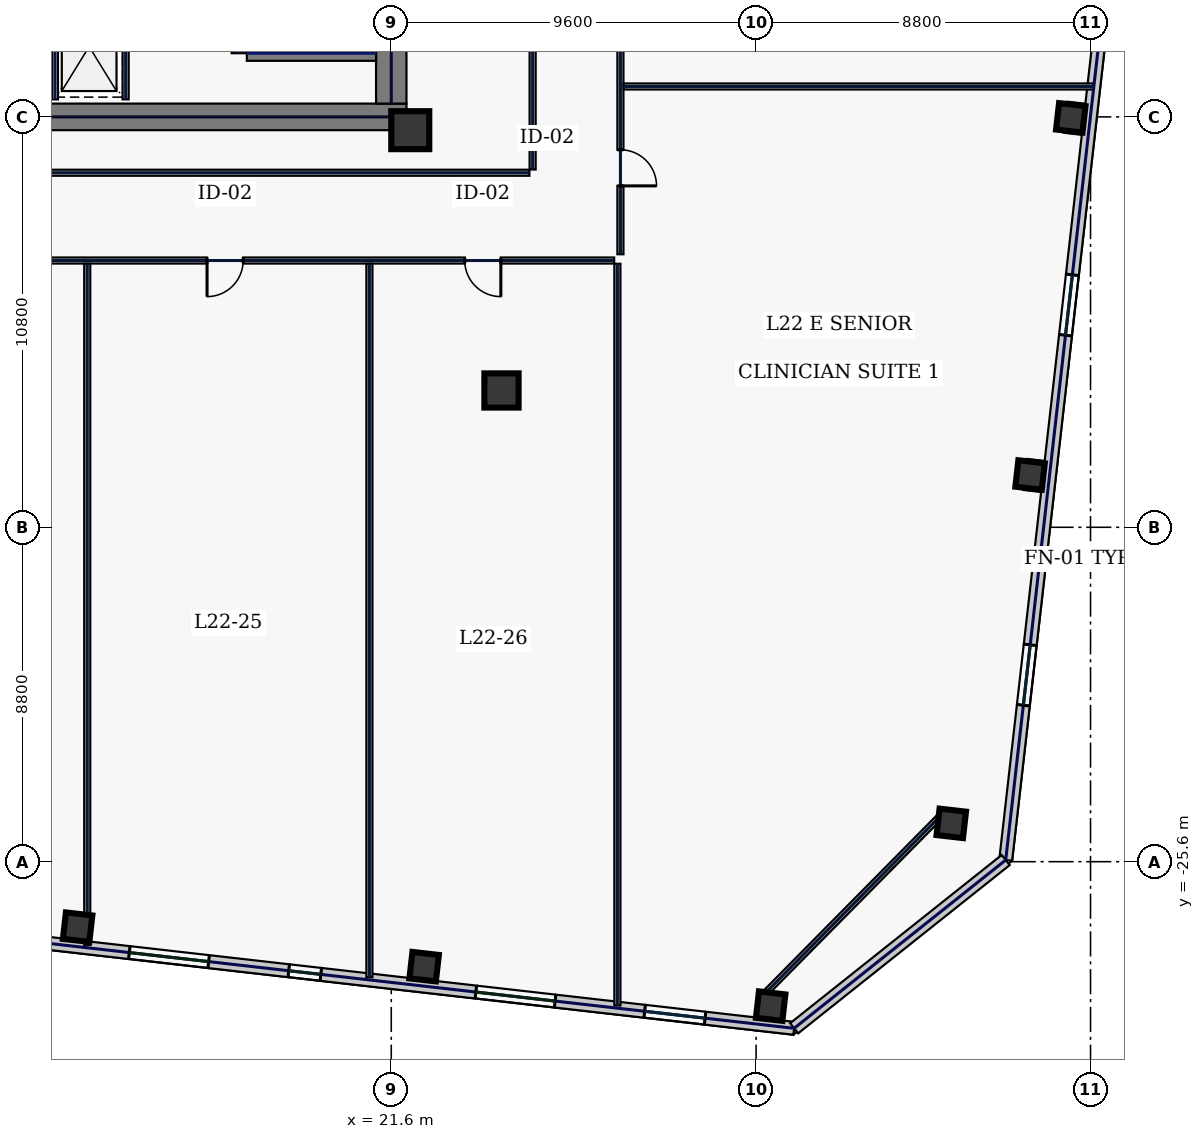
"""IFC4 building model, lengths in metres.
Left out: names, types, materials, properties, quantities, classifications, styles, units other than length and angle.
Written with IfcOpenShell. Run it as: python <this file> out.ifc"""

import sys

from ifc_helpers import new_model, si_unit, direction, frame, frame_2d, origin, origin_2d, place, context, subcontext, project, spatial, rectangle, hollow_rectangle, extrude, element, fill, save


model = new_model("IFC4")
c1 = context("Model", 3, precision=1e-05, world=origin(), true_north=direction((0.0, 1.0)))
c2 = subcontext(c1, "Body", "Model", "MODEL_VIEW")
j1 = project(units=[si_unit("LENGTHUNIT", "METRE"), si_unit("PLANEANGLEUNIT", "RADIAN")], contexts=[c1])
p1 = place(None, origin())
s1 = spatial("IfcSite", under=j1, at=p1, CompositionType="ELEMENT")
p2 = place(p1, origin())
s2 = spatial("IfcBuilding", under=s1, at=p2, CompositionType="ELEMENT")
p3 = place(p2, frame((0.0, 0.0, 101.4)))
s3 = spatial("IfcBuildingStorey", under=s2, at=p3, CompositionType="ELEMENT", Elevation=101.4)
p4 = place(p3, frame((10.45, -6.0, 0.0), z_axis=(0.0, 0.0, 1.0), x_axis=(1.0, 0.0, 0.0)))
e1 = element("IfcWall", 1, at=p4, inside=s3, PredefinedType="SHEAR", context=c2, shape_type="SweptSolid", body=[
    extrude(rectangle(XDim=11.55, YDim=0.7, at=frame_2d((5.775, 0.0))), origin(), (0.0, 0.0, 1.0), 3.74),
])
p5 = place(p3, frame((21.6, -5.65, 0.0), z_axis=(0.0, 0.0, 1.0), x_axis=(0.0, 1.0, 0.0)))
e2 = element("IfcWall", 2, at=p5, inside=s3, PredefinedType="SHEAR", context=c2, shape_type="SweptSolid", body=[
    extrude(rectangle(XDim=11.3, YDim=0.8, at=frame_2d((5.65, 0.0))), origin(), (0.0, 0.0, 1.0), 3.74),
])
p6 = place(p3, frame((17.6, -4.325, 0.0), z_axis=(0.0, 0.0, 1.0), x_axis=(0.0, 1.0, 0.0)))
e3 = element("IfcWall", 3, at=p6, inside=s3, PredefinedType="SHEAR", context=c2, shape_type="SweptSolid", body=[
    extrude(rectangle(XDim=8.65, YDim=0.4, at=frame_2d((4.325, 0.0))), origin(), (0.0, 0.0, 1.0), 3.74),
])
p7 = place(p6, frame((0.25, 0.0, 0.0)))
e4 = element("IfcOpeningElement", 4, at=p7, cuts=e3, PredefinedType="OPENING", context=c2, shape_type="SweptSolid", body=[
    extrude(rectangle(XDim=1.1, YDim=2.2, at=frame_2d((0.55, 1.1))), frame((0.0, 0.21, 0.0), z_axis=(0.0, -1.0, 0.0), x_axis=(1.0, 0.0, 0.0)), (0.0, 0.0, 1.0), 0.42),
])
p8 = place(p3, frame((17.8, -4.325, 0.0), z_axis=(0.0, 0.0, 1.0), x_axis=(1.0, 0.0, 0.0)))
e5 = element("IfcWall", 5, at=p8, inside=s3, PredefinedType="SHEAR", context=c2, shape_type="SweptSolid", body=[
    extrude(rectangle(XDim=3.4, YDim=0.4, at=frame_2d((1.7, 0.0))), origin(), (0.0, 0.0, 1.0), 3.74),
])
p9 = place(p3, frame((22.1, -6.35, 0.0), z_axis=(0.0, 0.0, 1.0), x_axis=(1.0, 0.0, 0.0)))
e6 = element("IfcColumn", 6, at=p9, inside=s3, PredefinedType="COLUMN", context=c2, shape_type="SweptSolid", body=[
    extrude(hollow_rectangle(XDim=1.0, YDim=1.0, WallThickness=0.045, at=origin_2d()), origin(), (0.0, 0.0, 1.0), 3.74),
])
p10 = place(p3, frame((24.5, -13.2, 0.0), z_axis=(0.0, 0.0, 1.0), x_axis=(1.0, 0.0, 0.0)))
e7 = element("IfcColumn", 7, at=p10, inside=s3, PredefinedType="COLUMN", context=c2, shape_type="SweptSolid", body=[
    extrude(hollow_rectangle(XDim=0.9, YDim=0.9, WallThickness=0.04, at=origin_2d()), origin(), (0.0, 0.0, 1.0), 3.74),
])
for number, where, z_axis, x_axis in (
    (8, (13.347, -27.323, 0.0), (0.0, 0.0, 1.0), (0.994, -0.113, 0.0)),
    (9, (22.465, -28.362, 0.0), (0.0, 0.0, 1.0), (0.994, -0.113, 0.0)),
    (10, (31.583, -29.401, 0.0), (0.0, 0.0, 1.0), (0.994, -0.113, 0.0)),
    (11, (36.336, -24.592, 0.0), (0.0, 0.0, 1.0), (0.994, -0.113, 0.0)),
    (12, (38.409, -15.424, 0.0), (0.0, 0.0, 1.0), (0.994, -0.113, 0.0)),
    (13, (39.48, -6.025, 0.0), (0.0, 0.0, 1.0), (0.994, -0.113, 0.0)),
):
    element("IfcColumn", number, at=place(p3, frame(where, z_axis=z_axis, x_axis=x_axis)), inside=s3, PredefinedType="COLUMN", context=c2, shape_type="SweptSolid", body=[
        extrude(hollow_rectangle(XDim=0.7, YDim=0.7, WallThickness=0.032, at=origin_2d()), origin(), (0.0, 0.0, 1.0), 3.74),
    ])
p11 = place(p3, frame((11.115, -27.582, 0.0), z_axis=(0.0, 0.0, 1.0), x_axis=(0.993572655904, -0.113196190044, 0.0)))
e14 = element("IfcWall", 14, at=p11, inside=s3, PredefinedType="STANDARD", context=c2, shape_type="SweptSolid", body=[
    extrude(rectangle(XDim=21.223, YDim=0.34, at=frame_2d((10.611, 0.0))), origin(), (0.0, 0.0, 1.0), 3.74),
])
p12 = place(p11, frame((3.616, 0.0, 0.67)))
e15 = element("IfcOpeningElement", 15, at=p12, cuts=e14, PredefinedType="OPENING", context=c2, shape_type="SweptSolid", body=[
    extrude(rectangle(XDim=2.1, YDim=2.2, at=frame_2d((1.05, 1.1))), frame((0.0, 0.18, 0.0), z_axis=(0.0, -1.0, 0.0), x_axis=(1.0, 0.0, 0.0)), (0.0, 0.0, 1.0), 0.36),
])
p13 = place(p11, frame((7.838, 0.0, 0.67)))
e16 = element("IfcOpeningElement", 16, at=p13, cuts=e14, PredefinedType="OPENING", context=c2, shape_type="SweptSolid", body=[
    extrude(rectangle(XDim=0.85, YDim=1.85, at=frame_2d((0.425, 0.925))), frame((0.0, 0.18, 0.0), z_axis=(0.0, -1.0, 0.0), x_axis=(1.0, 0.0, 0.0)), (0.0, 0.0, 1.0), 0.36),
])
p14 = place(p11, frame((12.794, 0.0, 0.67)))
e17 = element("IfcOpeningElement", 17, at=p14, cuts=e14, PredefinedType="OPENING", context=c2, shape_type="SweptSolid", body=[
    extrude(rectangle(XDim=2.1, YDim=2.2, at=frame_2d((1.05, 1.1))), frame((0.0, 0.18, 0.0), z_axis=(0.0, -1.0, 0.0), x_axis=(1.0, 0.0, 0.0)), (0.0, 0.0, 1.0), 0.36),
])
p15 = place(p11, frame((17.265, 0.0, 0.22)))
e18 = element("IfcOpeningElement", 18, at=p15, cuts=e14, PredefinedType="OPENING", context=c2, shape_type="SweptSolid", body=[
    extrude(rectangle(XDim=1.6, YDim=1.2, at=frame_2d((0.8, 0.6))), frame((0.0, 0.18, 0.0), z_axis=(0.0, -1.0, 0.0), x_axis=(1.0, 0.0, 0.0)), (0.0, 0.0, 1.0), 0.36),
])
p16 = place(p3, frame((37.768, -25.556, 0.0), z_axis=(0.0, 0.0, 1.0), x_axis=(0.113201605824, 0.993572038877, 0.0)))
e19 = element("IfcWall", 19, at=p16, inside=s3, PredefinedType="STANDARD", context=c2, shape_type="SweptSolid", body=[
    extrude(rectangle(XDim=39.2, YDim=0.34, at=frame_2d((19.6, 0.0))), origin(), (0.0, 0.0, 1.0), 3.74),
])
p17 = place(p16, frame((4.1, 0.0, 0.58)))
e20 = element("IfcOpeningElement", 20, at=p17, cuts=e19, PredefinedType="OPENING", context=c2, shape_type="SweptSolid", body=[
    extrude(rectangle(XDim=1.6, YDim=2.3, at=frame_2d((0.8, 1.15))), frame((0.0, 0.18, 0.0), z_axis=(0.0, -1.0, 0.0), x_axis=(1.0, 0.0, 0.0)), (0.0, 0.0, 1.0), 0.36),
])
p18 = place(p16, frame((13.9, 0.0, 0.58)))
e21 = element("IfcOpeningElement", 21, at=p18, cuts=e19, PredefinedType="OPENING", context=c2, shape_type="SweptSolid", body=[
    extrude(rectangle(XDim=1.6, YDim=2.3, at=frame_2d((0.8, 1.15))), frame((0.0, 0.18, 0.0), z_axis=(0.0, -1.0, 0.0), x_axis=(1.0, 0.0, 0.0)), (0.0, 0.0, 1.0), 0.36),
])
p19 = place(p16, frame((23.7, 0.0, 0.58)))
e22 = element("IfcOpeningElement", 22, at=p19, cuts=e19, PredefinedType="OPENING", context=c2, shape_type="SweptSolid", body=[
    extrude(rectangle(XDim=1.6, YDim=2.3, at=frame_2d((0.8, 1.15))), frame((0.0, 0.18, 0.0), z_axis=(0.0, -1.0, 0.0), x_axis=(1.0, 0.0, 0.0)), (0.0, 0.0, 1.0), 0.36),
])
p20 = place(p16, frame((33.5, 0.0, 0.58)))
e23 = element("IfcOpeningElement", 23, at=p20, cuts=e19, PredefinedType="OPENING", context=c2, shape_type="SweptSolid", body=[
    extrude(rectangle(XDim=1.6, YDim=2.3, at=frame_2d((0.8, 1.15))), frame((0.0, 0.18, 0.0), z_axis=(0.0, -1.0, 0.0), x_axis=(1.0, 0.0, 0.0)), (0.0, 0.0, 1.0), 0.36),
])
p21 = place(p3, frame((32.201, -29.985, 0.0), z_axis=(0.0, 0.0, 1.0), x_axis=(0.78261359446, 0.622507800567, 0.0)))
e24 = element("IfcWall", 24, at=p21, inside=s3, PredefinedType="STANDARD", context=c2, shape_type="SweptSolid", body=[
    extrude(rectangle(XDim=7.114, YDim=0.34, at=frame_2d((3.557, 0.0))), origin(), (0.0, 0.0, 1.0), 3.74),
])
for number, where, z_axis, x_axis in (
    (25, (12.75, -5.54, 0.0), (0.0, 0.0, 1.0), (0.0, 1.0, 0.0)),
    (26, (14.61, -5.54, 0.0), (0.0, 0.0, 1.0), (0.0, 1.0, 0.0)),
):
    element("IfcWall", number, at=place(p3, frame(where, z_axis=z_axis, x_axis=x_axis)), inside=s3, PredefinedType="PARTITIONING", context=c2, shape_type="SweptSolid", body=[
        extrude(rectangle(XDim=2.7, YDim=0.16, at=frame_2d((1.35, 0.0))), origin(), (0.0, 0.0, 1.0), 3.74),
    ])
p22 = place(p3, frame((31.341, -29.162, 0.0), z_axis=(0.0, 0.0, 1.0), x_axis=(0.702905898933, 0.711282853192, 0.0)))
e27 = element("IfcWall", 27, at=p22, inside=s3, PredefinedType="PARTITIONING", context=c2, shape_type="SweptSolid", body=[
    extrude(rectangle(XDim=6.761, YDim=0.16, at=frame_2d((3.381, 0.0))), origin(), (0.0, 0.0, 1.0), 3.74),
])
p23 = place(p3, frame((27.63, 9.665, 0.0), z_axis=(0.0, 0.0, 1.0), x_axis=(0.0, -1.0, 0.0)))
e28 = element("IfcWall", 28, at=p23, inside=s3, PredefinedType="PARTITIONING", context=c2, shape_type="SweptSolid", body=[
    extrude(rectangle(XDim=19.28, YDim=0.16, at=frame_2d((9.64, 0.0))), origin(), (0.0, 0.0, 1.0), 3.74),
])
p24 = place(p23, frame((16.531, 0.0, 0.0)))
e29 = element("IfcOpeningElement", 29, at=p24, cuts=e28, PredefinedType="OPENING", context=c2, shape_type="SweptSolid", body=[
    extrude(rectangle(XDim=0.95, YDim=2.2, at=frame_2d((0.475, 1.1))), frame((0.0, 0.09, 0.0), z_axis=(0.0, -1.0, 0.0), x_axis=(1.0, 0.0, 0.0)), (0.0, 0.0, 1.0), 0.18),
])
p25 = place(p23, frame((11.55, 0.0, 0.0)))
e30 = element("IfcOpeningElement", 30, at=p25, cuts=e28, PredefinedType="OPENING", context=c2, shape_type="SweptSolid", body=[
    extrude(rectangle(XDim=0.95, YDim=2.2, at=frame_2d((0.475, 1.1))), frame((0.0, 0.09, 0.0), z_axis=(0.0, -1.0, 0.0), x_axis=(1.0, 0.0, 0.0)), (0.0, 0.0, 1.0), 0.18),
])
p26 = place(p23, frame((6.05, 0.0, 0.0)))
e31 = element("IfcOpeningElement", 31, at=p26, cuts=e28, PredefinedType="OPENING", context=c2, shape_type="SweptSolid", body=[
    extrude(rectangle(XDim=0.95, YDim=2.2, at=frame_2d((0.475, 1.1))), frame((0.0, 0.09, 0.0), z_axis=(0.0, -1.0, 0.0), x_axis=(1.0, 0.0, 0.0)), (0.0, 0.0, 1.0), 0.18),
])
p27 = place(p23, frame((1.994, 0.0, 0.0)))
e32 = element("IfcOpeningElement", 32, at=p27, cuts=e28, PredefinedType="OPENING", context=c2, shape_type="SweptSolid", body=[
    extrude(rectangle(XDim=0.95, YDim=2.2, at=frame_2d((0.475, 1.1))), frame((0.0, 0.09, 0.0), z_axis=(0.0, -1.0, 0.0), x_axis=(1.0, 0.0, 0.0)), (0.0, 0.0, 1.0), 0.18),
])
p28 = place(p3, frame((27.465, -9.78, 0.0), z_axis=(0.0, 0.0, 1.0), x_axis=(-1.0, 0.0, 0.0)))
e33 = element("IfcWall", 33, at=p28, inside=s3, PredefinedType="PARTITIONING", context=c2, shape_type="SweptSolid", body=[
    extrude(rectangle(XDim=48.7, YDim=0.16, at=frame_2d((24.35, 0.0))), origin(), (0.0, 0.0, 1.0), 3.74),
])
p29 = place(p28, frame((35.74, 0.0, 0.0)))
e34 = element("IfcOpeningElement", 34, at=p29, cuts=e33, PredefinedType="OPENING", context=c2, shape_type="SweptSolid", body=[
    extrude(rectangle(XDim=0.95, YDim=2.2, at=frame_2d((0.475, 1.1))), frame((0.0, 0.09, 0.0), z_axis=(0.0, -1.0, 0.0), x_axis=(1.0, 0.0, 0.0)), (0.0, 0.0, 1.0), 0.18),
])
p30 = place(p28, frame((20.747, 0.0, 0.0)))
e35 = element("IfcOpeningElement", 35, at=p30, cuts=e33, PredefinedType="OPENING", context=c2, shape_type="SweptSolid", body=[
    extrude(rectangle(XDim=1.05, YDim=2.2, at=frame_2d((0.525, 1.1))), frame((0.0, 0.09, 0.0), z_axis=(0.0, -1.0, 0.0), x_axis=(1.0, 0.0, 0.0)), (0.0, 0.0, 1.0), 0.18),
])
p31 = place(p28, frame((9.762, 0.0, 0.0)))
e36 = element("IfcOpeningElement", 36, at=p31, cuts=e33, PredefinedType="OPENING", context=c2, shape_type="SweptSolid", body=[
    extrude(rectangle(XDim=0.95, YDim=2.2, at=frame_2d((0.475, 1.1))), frame((0.0, 0.09, 0.0), z_axis=(0.0, -1.0, 0.0), x_axis=(1.0, 0.0, 0.0)), (0.0, 0.0, 1.0), 0.18),
])
p32 = place(p28, frame((2.982, 0.0, 0.0)))
e37 = element("IfcOpeningElement", 37, at=p32, cuts=e33, PredefinedType="OPENING", context=c2, shape_type="SweptSolid", body=[
    extrude(rectangle(XDim=0.95, YDim=2.2, at=frame_2d((0.475, 1.1))), frame((0.0, 0.09, 0.0), z_axis=(0.0, -1.0, 0.0), x_axis=(1.0, 0.0, 0.0)), (0.0, 0.0, 1.0), 0.18),
])
p33 = place(p3, frame((10.665, -7.47, 0.0), z_axis=(0.0, 0.0, 1.0), x_axis=(1.0, 0.0, 0.0)))
e38 = element("IfcWall", 38, at=p33, inside=s3, PredefinedType="PARTITIONING", context=c2, shape_type="SweptSolid", body=[
    extrude(rectangle(XDim=14.57, YDim=0.16, at=frame_2d((7.285, 0.0))), origin(), (0.0, 0.0, 1.0), 3.74),
])
p34 = place(p3, frame((25.32, -7.385, 0.0), z_axis=(0.0, 0.0, 1.0), x_axis=(0.0, 1.0, 0.0)))
e39 = element("IfcWall", 39, at=p34, inside=s3, PredefinedType="PARTITIONING", context=c2, shape_type="SweptSolid", body=[
    extrude(rectangle(XDim=14.82, YDim=0.16, at=frame_2d((7.41, 0.0))), origin(), (0.0, 0.0, 1.0), 3.74),
])
p35 = place(p3, frame((27.55, -29.385, 0.0), z_axis=(0.0, 0.0, 1.0), x_axis=(0.0, 1.0, 0.0)))
e40 = element("IfcWall", 40, at=p35, inside=s3, PredefinedType="PARTITIONING", context=c2, shape_type="SweptSolid", body=[
    extrude(rectangle(XDim=19.52, YDim=0.16, at=frame_2d((9.76, 0.0))), origin(), (0.0, 0.0, 1.0), 3.74),
])
p36 = place(p3, frame((13.6, -27.795, 0.0), z_axis=(0.0, 0.0, 1.0), x_axis=(0.0, 1.0, 0.0)))
e41 = element("IfcWall", 41, at=p36, inside=s3, PredefinedType="PARTITIONING", context=c2, shape_type="SweptSolid", body=[
    extrude(rectangle(XDim=17.93, YDim=0.16, at=frame_2d((8.965, 0.0))), origin(), (0.0, 0.0, 1.0), 3.74),
])
p37 = place(p3, frame((21.025, -28.641, 0.0), z_axis=(0.0, 0.0, 1.0), x_axis=(0.0, 1.0, 0.0)))
e42 = element("IfcWall", 42, at=p37, inside=s3, PredefinedType="PARTITIONING", context=c2, shape_type="SweptSolid", body=[
    extrude(rectangle(XDim=18.776, YDim=0.16, at=frame_2d((9.388, 0.0))), origin(), (0.0, 0.0, 1.0), 3.74),
])
p38 = place(p3, frame((27.715, -5.2, 0.0), z_axis=(0.0, 0.0, 1.0), x_axis=(1.0, 0.0, 0.0)))
e43 = element("IfcWall", 43, at=p38, inside=s3, PredefinedType="PARTITIONING", context=c2, shape_type="SweptSolid", body=[
    extrude(rectangle(XDim=12.352, YDim=0.16, at=frame_2d((6.176, 0.0))), origin(), (0.0, 0.0, 1.0), 3.74),
])
p39 = place(p12, origin())
e44 = element("IfcWindow", 44, at=p39, inside=s3, PartitioningType="SINGLE_PANEL", PredefinedType="WINDOW", context=c2, shape_type="SweptSolid", body=[
    extrude(rectangle(XDim=2.1, YDim=2.2, at=frame_2d((1.05, 1.1))), frame((0.0, 0.03, 0.0), z_axis=(0.0, -1.0, 0.0), x_axis=(1.0, 0.0, 0.0)), (0.0, 0.0, 1.0), 0.06),
])
fill(e15, e44)
p40 = place(p13, origin())
e45 = element("IfcWindow", 45, at=p40, inside=s3, PartitioningType="SINGLE_PANEL", PredefinedType="WINDOW", context=c2, shape_type="SweptSolid", body=[
    extrude(rectangle(XDim=0.85, YDim=1.85, at=frame_2d((0.425, 0.925))), frame((0.0, 0.03, 0.0), z_axis=(0.0, -1.0, 0.0), x_axis=(1.0, 0.0, 0.0)), (0.0, 0.0, 1.0), 0.06),
])
fill(e16, e45)
p41 = place(p14, origin())
e46 = element("IfcWindow", 46, at=p41, inside=s3, PartitioningType="SINGLE_PANEL", PredefinedType="WINDOW", context=c2, shape_type="SweptSolid", body=[
    extrude(rectangle(XDim=2.1, YDim=2.2, at=frame_2d((1.05, 1.1))), frame((0.0, 0.03, 0.0), z_axis=(0.0, -1.0, 0.0), x_axis=(1.0, 0.0, 0.0)), (0.0, 0.0, 1.0), 0.06),
])
fill(e17, e46)
p42 = place(p15, origin())
e47 = element("IfcWindow", 47, at=p42, inside=s3, PartitioningType="SINGLE_PANEL", PredefinedType="WINDOW", context=c2, shape_type="SweptSolid", body=[
    extrude(rectangle(XDim=1.6, YDim=1.2, at=frame_2d((0.8, 0.6))), frame((0.0, 0.03, 0.0), z_axis=(0.0, -1.0, 0.0), x_axis=(1.0, 0.0, 0.0)), (0.0, 0.0, 1.0), 0.06),
])
fill(e18, e47)
p43 = place(p17, origin())
e48 = element("IfcWindow", 48, at=p43, inside=s3, PartitioningType="SINGLE_PANEL", PredefinedType="WINDOW", context=c2, shape_type="SweptSolid", body=[
    extrude(rectangle(XDim=1.6, YDim=2.3, at=frame_2d((0.8, 1.15))), frame((0.0, 0.03, 0.0), z_axis=(0.0, -1.0, 0.0), x_axis=(1.0, 0.0, 0.0)), (0.0, 0.0, 1.0), 0.06),
])
fill(e20, e48)
p44 = place(p18, origin())
e49 = element("IfcWindow", 49, at=p44, inside=s3, PartitioningType="SINGLE_PANEL", PredefinedType="WINDOW", context=c2, shape_type="SweptSolid", body=[
    extrude(rectangle(XDim=1.6, YDim=2.3, at=frame_2d((0.8, 1.15))), frame((0.0, 0.03, 0.0), z_axis=(0.0, -1.0, 0.0), x_axis=(1.0, 0.0, 0.0)), (0.0, 0.0, 1.0), 0.06),
])
fill(e21, e49)
p45 = place(p31, origin())
e50 = element("IfcDoor", 50, at=p45, inside=s3, OperationType="SINGLE_SWING_RIGHT", PredefinedType="DOOR", context=c2, shape_type="SweptSolid", body=[
    extrude(rectangle(XDim=0.95, YDim=2.2, at=frame_2d((0.475, 1.1))), frame((0.0, 0.025, 0.0), z_axis=(0.0, -1.0, 0.0), x_axis=(1.0, 0.0, 0.0)), (0.0, 0.0, 1.0), 0.05),
])
fill(e36, e50)
p46 = place(p32, origin())
e51 = element("IfcDoor", 51, at=p46, inside=s3, OperationType="SINGLE_SWING_LEFT", PredefinedType="DOOR", context=c2, shape_type="SweptSolid", body=[
    extrude(rectangle(XDim=0.95, YDim=2.2, at=frame_2d((0.475, 1.1))), frame((0.0, 0.025, 0.0), z_axis=(0.0, -1.0, 0.0), x_axis=(1.0, 0.0, 0.0)), (0.0, 0.0, 1.0), 0.05),
])
fill(e37, e51)
p47 = place(p24, origin())
e52 = element("IfcDoor", 52, at=p47, inside=s3, OperationType="SINGLE_SWING_RIGHT", PredefinedType="DOOR", context=c2, shape_type="SweptSolid", body=[
    extrude(rectangle(XDim=0.95, YDim=2.2, at=frame_2d((0.475, 1.1))), frame((0.0, 0.025, 0.0), z_axis=(0.0, -1.0, 0.0), x_axis=(1.0, 0.0, 0.0)), (0.0, 0.0, 1.0), 0.05),
])
fill(e29, e52)
save(model, sys.argv[1])
